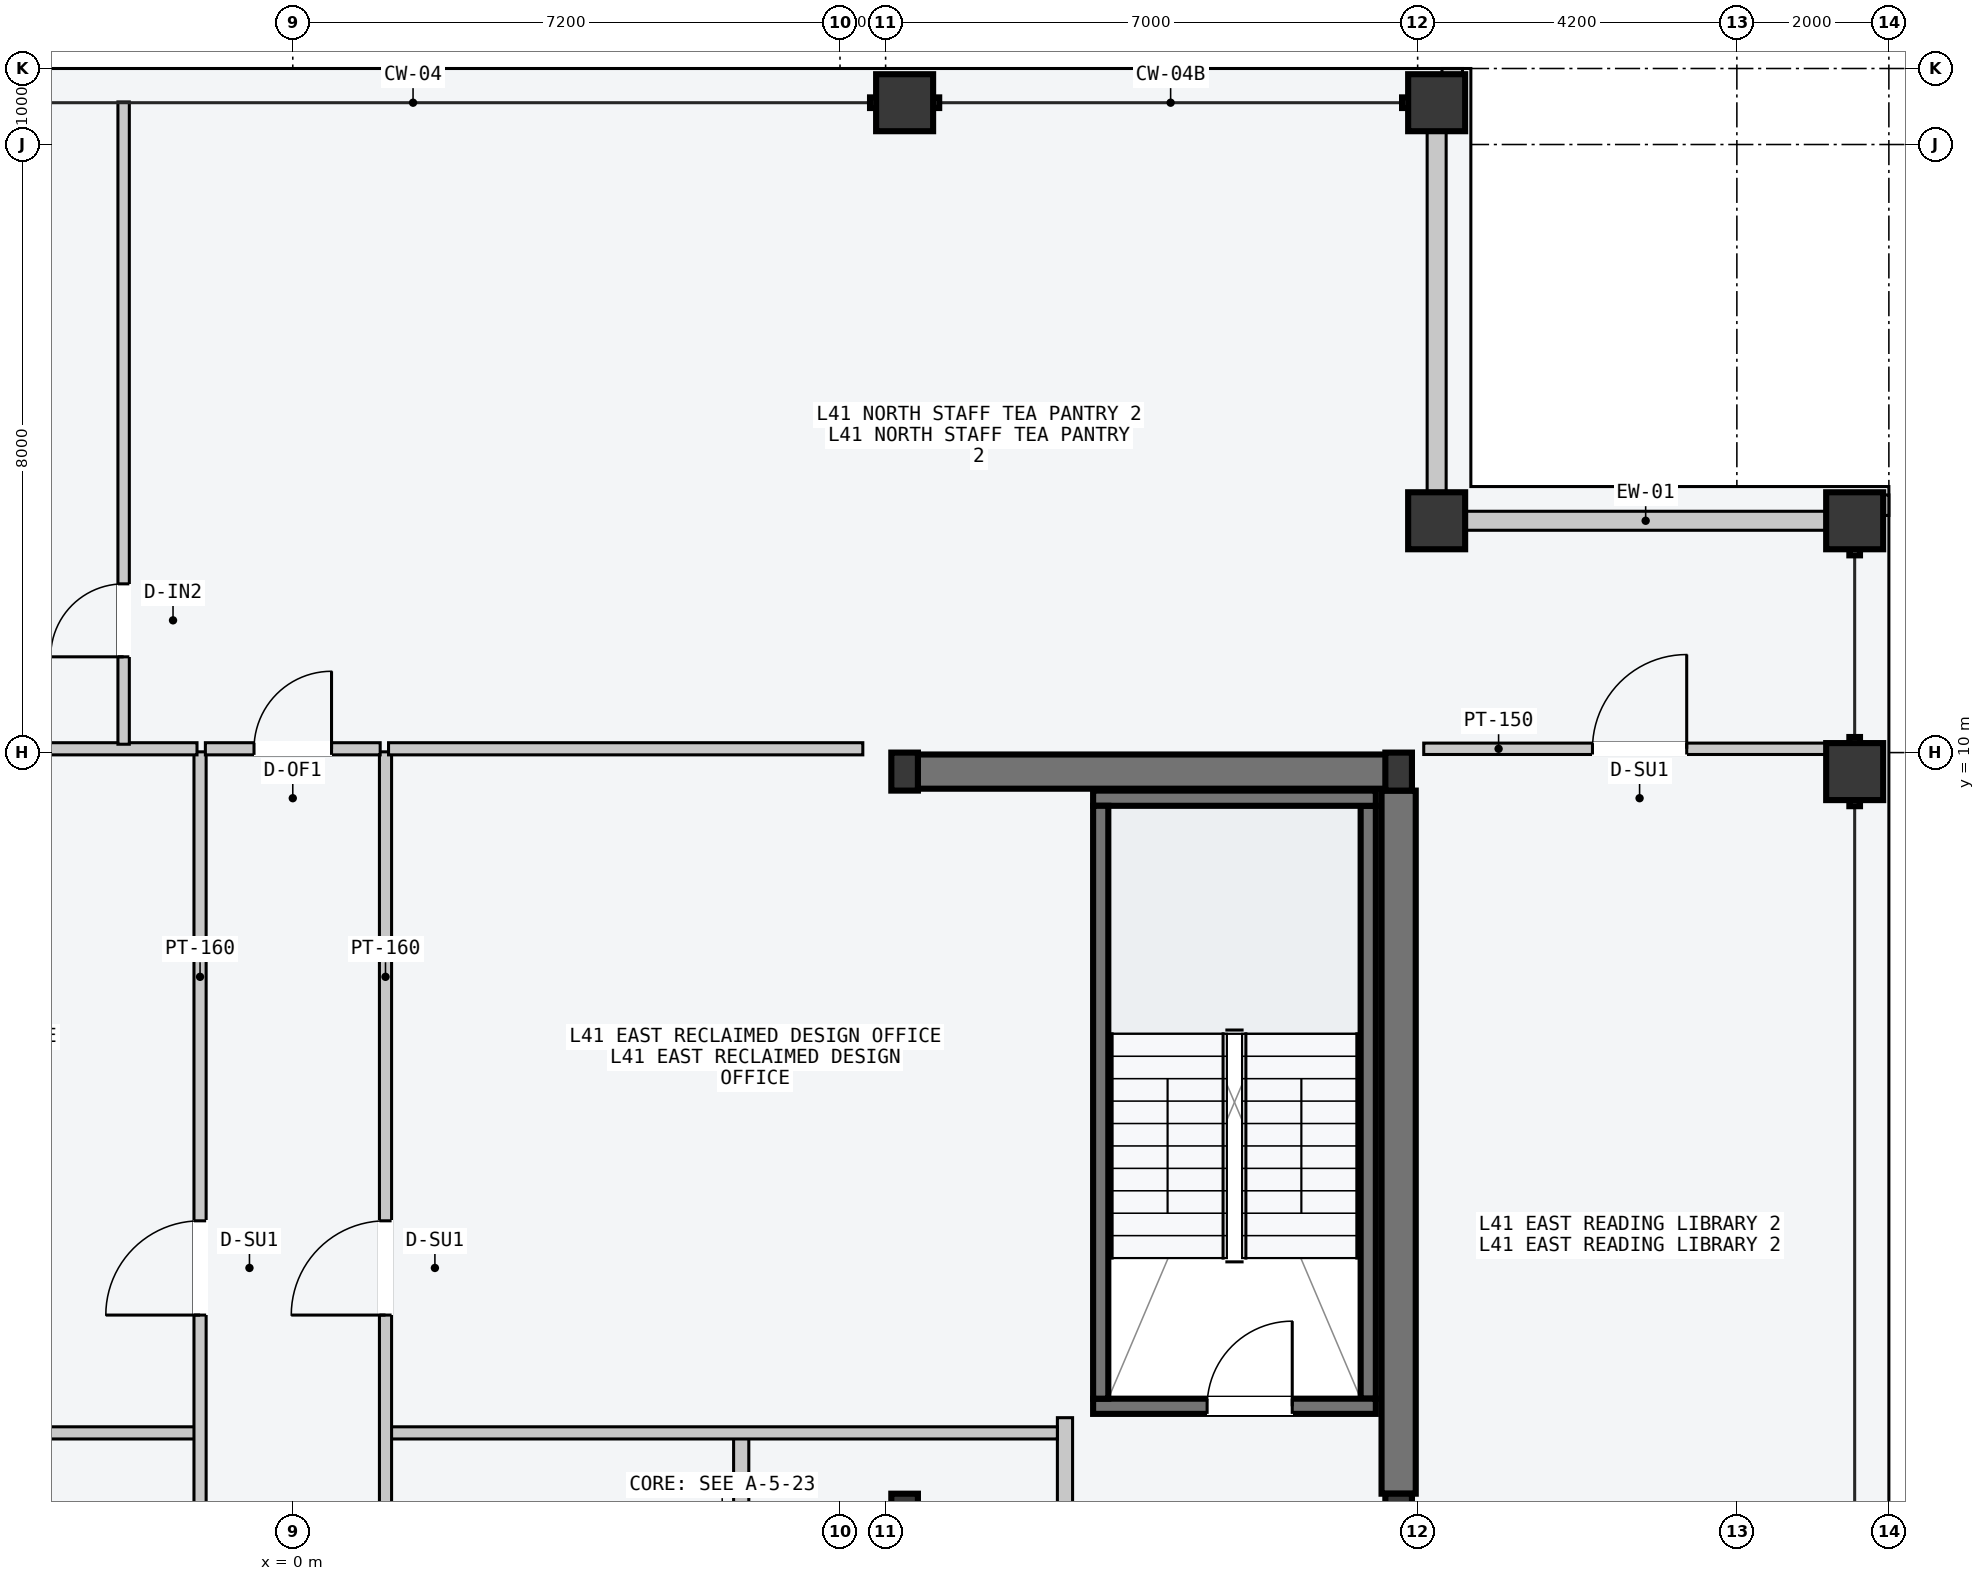
"""IFC4 building model, lengths in metres.
Left out: names, types, materials, properties, quantities, classifications, styles, units other than length and angle.
Written with IfcOpenShell. Run it as: python <this file> out.ifc"""

import sys

from ifc_helpers import new_model, si_unit, direction, frame, frame_2d, origin, origin_2d, place, context, subcontext, project, spatial, rectangle, hollow_rectangle, i_section, extrude, element, fill, save


model = new_model("IFC4")
c1 = context("Model", 3, precision=1e-05, world=origin(), true_north=direction((0.0, 1.0)))
c2 = subcontext(c1, "Body", "Model", "MODEL_VIEW")
j1 = project(units=[si_unit("LENGTHUNIT", "METRE"), si_unit("PLANEANGLEUNIT", "RADIAN")], contexts=[c1])
p1 = place(None, origin())
s1 = spatial("IfcSite", under=j1, at=p1, CompositionType="ELEMENT")
p2 = place(p1, origin())
s2 = spatial("IfcBuilding", under=s1, at=p2, CompositionType="ELEMENT")
p3 = place(p2, frame((0.0, 0.0, 158.7)))
s3 = spatial("IfcBuildingStorey", under=s2, at=p3, CompositionType="ELEMENT", Elevation=158.7)
p4 = place(p3, frame((8.07, 9.75, -0.2), z_axis=(0.0, 0.0, 1.0), x_axis=(1.0, 0.0, 0.0)))
e1 = element("IfcWall", 1, at=p4, inside=s3, PredefinedType="SHEAR", context=c2, shape_type="SweptSolid", body=[
    extrude(rectangle(XDim=6.46, YDim=0.45, at=frame_2d((3.23, 0.0))), origin(), (0.0, 0.0, 1.0), 3.6),
])
p5 = place(p3, frame((14.55, 0.25, -0.2), z_axis=(0.0, 0.0, 1.0), x_axis=(0.0, 1.0, 0.0)))
e2 = element("IfcWall", 2, at=p5, inside=s3, PredefinedType="SHEAR", context=c2, shape_type="SweptSolid", body=[
    extrude(rectangle(XDim=9.25, YDim=0.45, at=frame_2d((4.625, 0.0))), origin(), (0.0, 0.0, 1.0), 3.6),
])
p6 = place(p3, frame((14.15, 1.5, -0.2), z_axis=(0.0, 0.0, 1.0), x_axis=(0.0, 1.0, 0.0)))
e3 = element("IfcWall", 3, at=p6, inside=s3, PredefinedType="SOLIDWALL", context=c2, shape_type="SweptSolid", body=[
    extrude(rectangle(XDim=7.8, YDim=0.2, at=frame_2d((3.9, 0.0))), origin(), (0.0, 0.0, 1.0), 3.6),
])
p7 = place(p3, frame((10.53, 1.4, -0.2), z_axis=(0.0, 0.0, 1.0), x_axis=(1.0, 0.0, 0.0)))
e4 = element("IfcWall", 4, at=p7, inside=s3, PredefinedType="SOLIDWALL", context=c2, shape_type="SweptSolid", body=[
    extrude(rectangle(XDim=3.72, YDim=0.2, at=frame_2d((1.86, 0.0))), origin(), (0.0, 0.0, 1.0), 3.6),
])
p8 = place(p7, frame((1.5, 0.0, 0.2)))
e5 = element("IfcOpeningElement", 5, at=p8, cuts=e4, PredefinedType="OPENING", context=c2, shape_type="SweptSolid", body=[
    extrude(rectangle(XDim=1.12, YDim=2.18, at=frame_2d((0.56, 1.09))), frame((0.0, 0.11, 0.0), z_axis=(0.0, -1.0, 0.0), x_axis=(1.0, 0.0, 0.0)), (0.0, 0.0, 1.0), 0.22),
])
p9 = place(p3, frame((10.53, 9.4, -0.2), z_axis=(0.0, 0.0, 1.0), x_axis=(1.0, 0.0, 0.0)))
e6 = element("IfcWall", 6, at=p9, inside=s3, PredefinedType="SOLIDWALL", context=c2, shape_type="SweptSolid", body=[
    extrude(rectangle(XDim=3.72, YDim=0.2, at=frame_2d((1.86, 0.0))), origin(), (0.0, 0.0, 1.0), 3.6),
])
p10 = place(p3, frame((10.63, 1.5, -0.2), z_axis=(0.0, 0.0, 1.0), x_axis=(0.0, 1.0, 0.0)))
e7 = element("IfcWall", 7, at=p10, inside=s3, PredefinedType="SOLIDWALL", context=c2, shape_type="SweptSolid", body=[
    extrude(rectangle(XDim=7.8, YDim=0.2, at=frame_2d((3.9, 0.0))), origin(), (0.0, 0.0, 1.0), 3.6),
])
for number, where, z_axis, x_axis in (
    (8, (8.05, 0.0, 0.0), (0.0, 0.0, 1.0), (1.0, 0.0, 0.0)),
    (9, (8.05, 9.75, 0.0), (0.0, 0.0, 1.0), (1.0, 0.0, 0.0)),
    (10, (14.55, 0.0, 0.0), (0.0, 0.0, 1.0), (1.0, 0.0, 0.0)),
    (11, (14.55, 9.75, 0.0), (0.0, 0.0, 1.0), (1.0, 0.0, 0.0)),
):
    element("IfcColumn", number, at=place(p3, frame(where, z_axis=z_axis, x_axis=x_axis)), inside=s3, PredefinedType="COLUMN", context=c2, shape_type="SweptSolid", body=[
        extrude(i_section(OverallWidth=0.35, OverallDepth=0.5, WebThickness=0.02, FlangeThickness=0.032, at=origin_2d()), origin(), (0.0, 0.0, 1.0), 3.6),
    ])
for number, where, z_axis, x_axis in (
    (12, (8.05, 18.55, 0.0), (0.0, 0.0, 1.0), (1.0, 0.0, 0.0)),
    (13, (15.05, 18.55, 0.0), (0.0, 0.0, 1.0), (1.0, 0.0, 0.0)),
    (14, (20.55, 9.75, 0.0), (0.0, 0.0, 1.0), (0.0, 1.0, 0.0)),
    (15, (20.55, 13.05, 0.0), (0.0, 0.0, 1.0), (0.0, 1.0, 0.0)),
    (16, (15.05, 13.05, 0.0), (0.0, 0.0, 1.0), (1.0, 0.0, 0.0)),
):
    element("IfcColumn", number, at=place(p3, frame(where, z_axis=z_axis, x_axis=x_axis)), inside=s3, PredefinedType="COLUMN", context=c2, shape_type="SweptSolid", body=[
        extrude(hollow_rectangle(XDim=0.75, YDim=0.75, WallThickness=0.032, at=origin_2d()), origin(), (0.0, 0.0, 1.0), 3.6),
    ])
for number, where, z_axis, x_axis in (
    (17, (15.435, 13.05, 0.0), (0.0, 0.0, 1.0), (1.0, 0.0, 0.0)),
    (18, (15.05, 13.435, 0.0), (0.0, 0.0, 1.0), (0.0, 1.0, 0.0)),
):
    element("IfcWall", number, at=place(p3, frame(where, z_axis=z_axis, x_axis=x_axis)), inside=s3, PredefinedType="STANDARD", context=c2, shape_type="SweptSolid", body=[
        extrude(rectangle(XDim=4.73, YDim=0.25, at=frame_2d((2.365, 0.0))), origin(), (0.0, 0.0, 1.0), 2.75),
    ])
for number, where, z_axis, x_axis in (
    (19, (15.12, 18.89, 0.0), (0.0, 0.0, 1.0), (1.0, 0.0, 0.0)),
    (20, (20.89, 13.12, 0.0), (0.0, 0.0, 1.0), (0.0, 1.0, 0.0)),
):
    element("IfcWall", number, at=place(p3, frame(where, z_axis=z_axis, x_axis=x_axis)), inside=s3, PredefinedType="PARAPET", context=c2, shape_type="SweptSolid", body=[
        extrude(rectangle(XDim=0.27, YDim=0.22, at=frame_2d((0.135, 0.0))), origin(), (0.0, 0.0, 1.0), 1.2),
    ])
p11 = place(p3, frame((5.9, -9.45, 0.0), z_axis=(0.0, 0.0, 1.0), x_axis=(0.0, 1.0, 0.0)))
e21 = element("IfcWall", 21, at=p11, inside=s3, PredefinedType="PARTITIONING", context=c2, shape_type="SweptSolid", body=[
    extrude(rectangle(XDim=10.5, YDim=0.2, at=frame_2d((5.25, 0.0))), origin(), (0.0, 0.0, 1.0), 3.4),
])
p12 = place(p11, frame((3.9, 0.0, 0.0)))
e22 = element("IfcOpeningElement", 22, at=p12, cuts=e21, PredefinedType="OPENING", context=c2, shape_type="SweptSolid", body=[
    extrude(rectangle(XDim=1.5, YDim=2.2, at=frame_2d((0.75, 1.1))), frame((0.0, 0.11, 0.0), z_axis=(0.0, -1.0, 0.0), x_axis=(1.0, 0.0, 0.0)), (0.0, 0.0, 1.0), 0.22),
])
p13 = place(p3, frame((10.16, -2.55, 0.0), z_axis=(0.0, 0.0, 1.0), x_axis=(0.0, 1.0, 0.0)))
e23 = element("IfcWall", 23, at=p13, inside=s3, PredefinedType="PARTITIONING", context=c2, shape_type="SweptSolid", body=[
    extrude(rectangle(XDim=3.8, YDim=0.2, at=frame_2d((1.9, 0.0))), origin(), (0.0, 0.0, 1.0), 3.4),
])
p14 = place(p13, frame((1.3, 0.0, 0.0)))
e24 = element("IfcOpeningElement", 24, at=p14, cuts=e23, PredefinedType="OPENING", context=c2, shape_type="SweptSolid", body=[
    extrude(rectangle(XDim=1.1, YDim=2.15, at=frame_2d((0.55, 1.075))), frame((0.0, 0.11, 0.0), z_axis=(0.0, -1.0, 0.0), x_axis=(1.0, 0.0, 0.0)), (0.0, 0.0, 1.0), 0.22),
])
p15 = place(p3, frame((-10.05, 1.05, 0.0), z_axis=(0.0, 0.0, 1.0), x_axis=(1.0, 0.0, 0.0)))
e25 = element("IfcWall", 25, at=p15, inside=s3, PredefinedType="PARTITIONING", context=c2, shape_type="SweptSolid", body=[
    extrude(rectangle(XDim=8.79, YDim=0.16, at=frame_2d((4.395, 0.0))), origin(), (0.0, 0.0, 1.0), 3.4),
])
p16 = place(p3, frame((-1.22, -3.5, 0.0), z_axis=(0.0, 0.0, 1.0), x_axis=(0.0, 1.0, 0.0)))
e26 = element("IfcWall", 26, at=p16, inside=s3, PredefinedType="PARTITIONING", context=c2, shape_type="SweptSolid", body=[
    extrude(rectangle(XDim=13.51, YDim=0.16, at=frame_2d((6.755, 0.0))), origin(), (0.0, 0.0, 1.0), 3.4),
])
p17 = place(p16, frame((6.1, 0.0, 0.0)))
e27 = element("IfcOpeningElement", 27, at=p17, cuts=e26, PredefinedType="OPENING", context=c2, shape_type="SweptSolid", body=[
    extrude(rectangle(XDim=1.24, YDim=2.24, at=frame_2d((0.62, 1.12))), frame((0.0, 0.09, 0.0), z_axis=(0.0, -1.0, 0.0), x_axis=(1.0, 0.0, 0.0)), (0.0, 0.0, 1.0), 0.18),
])
p18 = place(p16, frame((1.6, 0.0, 0.0)))
e28 = element("IfcOpeningElement", 28, at=p18, cuts=e26, PredefinedType="OPENING", context=c2, shape_type="SweptSolid", body=[
    extrude(rectangle(XDim=0.96, YDim=2.18, at=frame_2d((0.48, 1.09))), frame((0.0, 0.09, 0.0), z_axis=(0.0, -1.0, 0.0), x_axis=(1.0, 0.0, 0.0)), (0.0, 0.0, 1.0), 0.18),
])
p19 = place(p3, frame((-7.5, 10.05, 0.0), z_axis=(0.0, 0.0, 1.0), x_axis=(1.0, 0.0, 0.0)))
e29 = element("IfcWall", 29, at=p19, inside=s3, PredefinedType="PARTITIONING", context=c2, shape_type="SweptSolid", body=[
    extrude(rectangle(XDim=6.24, YDim=0.16, at=frame_2d((3.12, 0.0))), origin(), (0.0, 0.0, 1.0), 3.4),
])
p20 = place(p3, frame((1.26, 1.05, 0.0), z_axis=(0.0, 0.0, 1.0), x_axis=(1.0, 0.0, 0.0)))
e30 = element("IfcWall", 30, at=p20, inside=s3, PredefinedType="PARTITIONING", context=c2, shape_type="SweptSolid", body=[
    extrude(rectangle(XDim=8.8, YDim=0.16, at=frame_2d((4.4, 0.0))), origin(), (0.0, 0.0, 1.0), 3.4),
])
p21 = place(p3, frame((1.22, -3.5, 0.0), z_axis=(0.0, 0.0, 1.0), x_axis=(0.0, 1.0, 0.0)))
e31 = element("IfcWall", 31, at=p21, inside=s3, PredefinedType="PARTITIONING", context=c2, shape_type="SweptSolid", body=[
    extrude(rectangle(XDim=13.51, YDim=0.16, at=frame_2d((6.755, 0.0))), origin(), (0.0, 0.0, 1.0), 3.4),
])
p22 = place(p21, frame((6.1, 0.0, 0.0)))
e32 = element("IfcOpeningElement", 32, at=p22, cuts=e31, PredefinedType="OPENING", context=c2, shape_type="SweptSolid", body=[
    extrude(rectangle(XDim=1.24, YDim=2.24, at=frame_2d((0.62, 1.12))), frame((0.0, 0.09, 0.0), z_axis=(0.0, -1.0, 0.0), x_axis=(1.0, 0.0, 0.0)), (0.0, 0.0, 1.0), 0.18),
])
p23 = place(p21, frame((1.6, 0.0, 0.0)))
e33 = element("IfcOpeningElement", 33, at=p23, cuts=e31, PredefinedType="OPENING", context=c2, shape_type="SweptSolid", body=[
    extrude(rectangle(XDim=0.96, YDim=2.18, at=frame_2d((0.48, 1.09))), frame((0.0, 0.09, 0.0), z_axis=(0.0, -1.0, 0.0), x_axis=(1.0, 0.0, 0.0)), (0.0, 0.0, 1.0), 0.18),
])
p24 = place(p3, frame((1.26, 10.05, 0.0), z_axis=(0.0, 0.0, 1.0), x_axis=(1.0, 0.0, 0.0)))
e34 = element("IfcWall", 34, at=p24, inside=s3, PredefinedType="PARTITIONING", context=c2, shape_type="SweptSolid", body=[
    extrude(rectangle(XDim=6.24, YDim=0.16, at=frame_2d((3.12, 0.0))), origin(), (0.0, 0.0, 1.0), 3.4),
])
p25 = place(p3, frame((-2.226, 10.11, 0.0), z_axis=(0.0, 0.0, 1.0), x_axis=(0.0, 1.0, 0.0)))
e35 = element("IfcWall", 35, at=p25, inside=s3, PredefinedType="PARTITIONING", context=c2, shape_type="SweptSolid", body=[
    extrude(rectangle(XDim=8.45, YDim=0.15, at=frame_2d((4.225, 0.0))), origin(), (0.0, 0.0, 1.0), 3.4),
])
p26 = place(p25, frame((1.15, 0.0, 0.0)))
e36 = element("IfcOpeningElement", 36, at=p26, cuts=e35, PredefinedType="OPENING", context=c2, shape_type="SweptSolid", body=[
    extrude(rectangle(XDim=0.96, YDim=2.18, at=frame_2d((0.48, 1.09))), frame((0.0, 0.085, 0.0), z_axis=(0.0, -1.0, 0.0), x_axis=(1.0, 0.0, 0.0)), (0.0, 0.0, 1.0), 0.17),
])
p27 = place(p3, frame((-1.15, 10.05, 0.0), z_axis=(0.0, 0.0, 1.0), x_axis=(1.0, 0.0, 0.0)))
e37 = element("IfcWall", 37, at=p27, inside=s3, PredefinedType="PARTITIONING", context=c2, shape_type="SweptSolid", body=[
    extrude(rectangle(XDim=2.3, YDim=0.16, at=frame_2d((1.15, 0.0))), origin(), (0.0, 0.0, 1.0), 3.4),
])
p28 = place(p27, frame((0.64, 0.0, 0.0)))
e38 = element("IfcOpeningElement", 38, at=p28, cuts=e37, PredefinedType="OPENING", context=c2, shape_type="SweptSolid", body=[
    extrude(rectangle(XDim=1.02, YDim=2.2, at=frame_2d((0.51, 1.1))), frame((0.0, 0.09, 0.0), z_axis=(0.0, -1.0, 0.0), x_axis=(1.0, 0.0, 0.0)), (0.0, 0.0, 1.0), 0.18),
])
p29 = place(p3, frame((14.88, 10.05, 0.0), z_axis=(0.0, 0.0, 1.0), x_axis=(1.0, 0.0, 0.0)))
e39 = element("IfcWall", 39, at=p29, inside=s3, PredefinedType="PARTITIONING", context=c2, shape_type="SweptSolid", body=[
    extrude(rectangle(XDim=5.68, YDim=0.15, at=frame_2d((2.84, 0.0))), origin(), (0.0, 0.0, 1.0), 3.4),
])
p30 = place(p29, frame((2.22, 0.0, 0.0)))
e40 = element("IfcOpeningElement", 40, at=p30, cuts=e39, PredefinedType="OPENING", context=c2, shape_type="SweptSolid", body=[
    extrude(rectangle(XDim=1.24, YDim=2.24, at=frame_2d((0.62, 1.12))), frame((0.0, 0.085, 0.0), z_axis=(0.0, -1.0, 0.0), x_axis=(1.0, 0.0, 0.0)), (0.0, 0.0, 1.0), 0.17),
])
p31 = place(p8, origin())
e41 = element("IfcDoor", 41, at=p31, inside=s3, OperationType="SINGLE_SWING_RIGHT", PredefinedType="DOOR", context=c2, shape_type="SweptSolid", body=[
    extrude(rectangle(XDim=1.12, YDim=2.18, at=frame_2d((0.56, 1.09))), frame((0.0, 0.025, 0.0), z_axis=(0.0, -1.0, 0.0), x_axis=(1.0, 0.0, 0.0)), (0.0, 0.0, 1.0), 0.05),
])
fill(e5, e41)
p32 = place(p17, origin())
e42 = element("IfcDoor", 42, at=p32, inside=s3, OperationType="SINGLE_SWING_LEFT", PredefinedType="DOOR", context=c2, shape_type="SweptSolid", body=[
    extrude(rectangle(XDim=1.24, YDim=2.24, at=frame_2d((0.62, 1.12))), frame((0.0, 0.025, 0.0), z_axis=(0.0, -1.0, 0.0), x_axis=(1.0, 0.0, 0.0)), (0.0, 0.0, 1.0), 0.05),
])
fill(e27, e42)
p33 = place(p22, origin())
e43 = element("IfcDoor", 43, at=p33, inside=s3, OperationType="SINGLE_SWING_LEFT", PredefinedType="DOOR", context=c2, shape_type="SweptSolid", body=[
    extrude(rectangle(XDim=1.24, YDim=2.24, at=frame_2d((0.62, 1.12))), frame((0.0, 0.025, 0.0), z_axis=(0.0, -1.0, 0.0), x_axis=(1.0, 0.0, 0.0)), (0.0, 0.0, 1.0), 0.05),
])
fill(e32, e43)
p34 = place(p26, origin())
e44 = element("IfcDoor", 44, at=p34, inside=s3, OperationType="SINGLE_SWING_LEFT", PredefinedType="DOOR", context=c2, shape_type="SweptSolid", body=[
    extrude(rectangle(XDim=0.96, YDim=2.18, at=frame_2d((0.48, 1.09))), frame((0.0, 0.025, 0.0), z_axis=(0.0, -1.0, 0.0), x_axis=(1.0, 0.0, 0.0)), (0.0, 0.0, 1.0), 0.05),
])
fill(e36, e44)
p35 = place(p28, origin())
e45 = element("IfcDoor", 45, at=p35, inside=s3, OperationType="SINGLE_SWING_RIGHT", PredefinedType="DOOR", context=c2, shape_type="SweptSolid", body=[
    extrude(rectangle(XDim=1.02, YDim=2.2, at=frame_2d((0.51, 1.1))), frame((0.0, 0.025, 0.0), z_axis=(0.0, -1.0, 0.0), x_axis=(1.0, 0.0, 0.0)), (0.0, 0.0, 1.0), 0.05),
])
fill(e38, e45)
p36 = place(p30, origin())
e46 = element("IfcDoor", 46, at=p36, inside=s3, OperationType="SINGLE_SWING_RIGHT", PredefinedType="DOOR", context=c2, shape_type="SweptSolid", body=[
    extrude(rectangle(XDim=1.24, YDim=2.24, at=frame_2d((0.62, 1.12))), frame((0.0, 0.025, 0.0), z_axis=(0.0, -1.0, 0.0), x_axis=(1.0, 0.0, 0.0)), (0.0, 0.0, 1.0), 0.05),
])
fill(e40, e46)
save(model, sys.argv[1])
